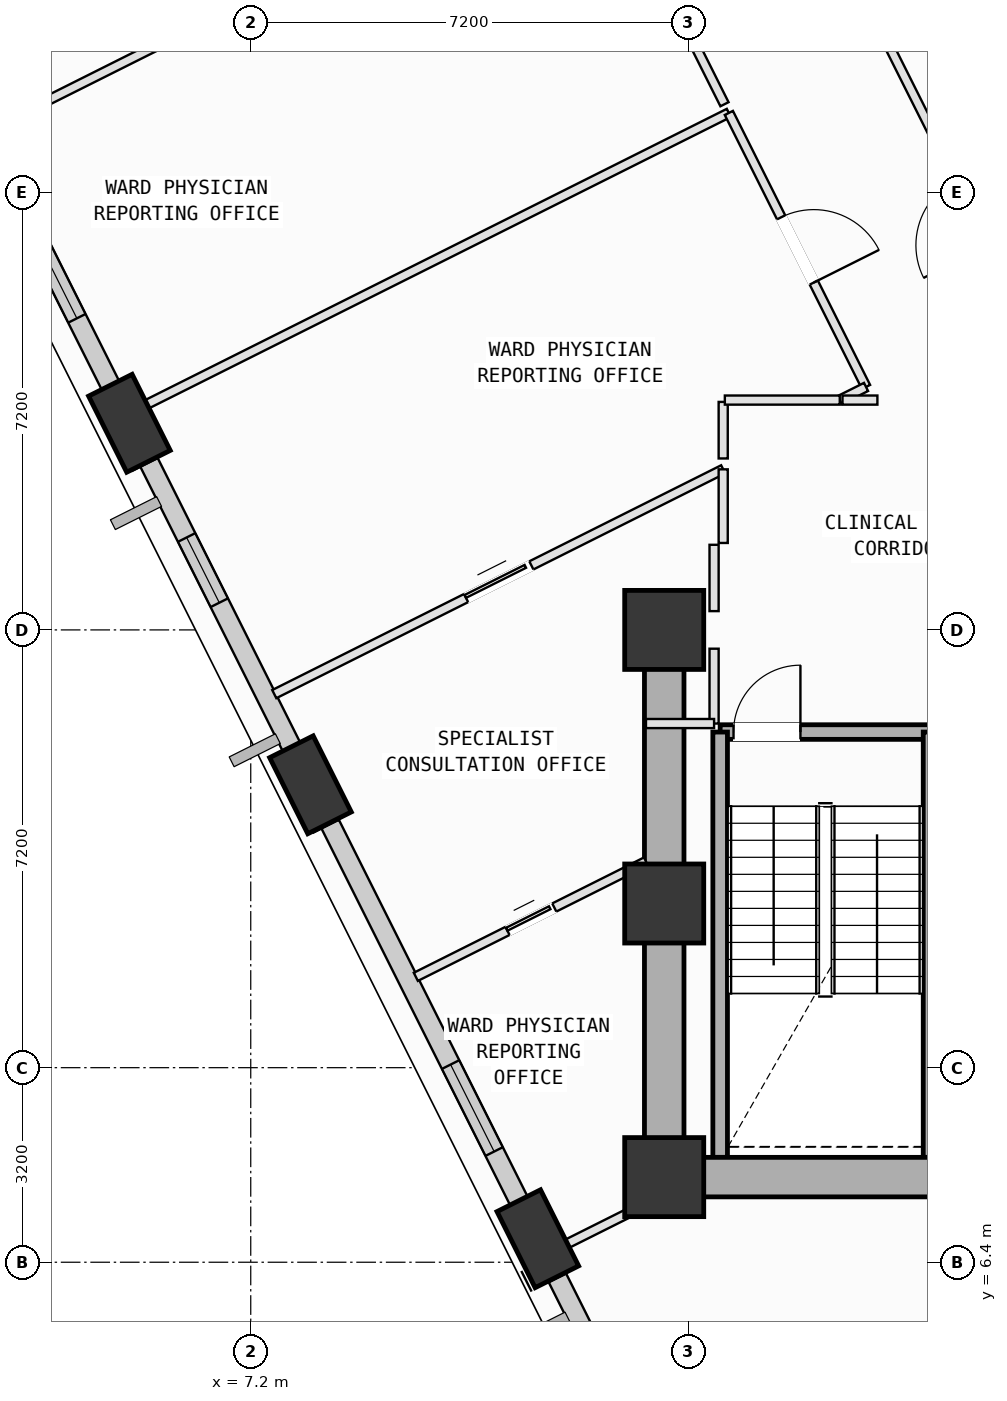
"""IFC4 building model, lengths in metres.
Left out: names, types, materials, properties, quantities, classifications, styles, units other than length and angle.
Written with IfcOpenShell. Run it as: python <this file> out.ifc"""

import sys

from ifc_helpers import new_model, si_unit, direction, frame, frame_2d, origin, origin_2d, place, context, subcontext, project, spatial, rectangle, extrude, element, fill, save


model = new_model("IFC4")
c1 = context("Model", 3, precision=1e-05, world=origin(), true_north=direction((0.0, 1.0)))
c2 = subcontext(c1, "Body", "Model", "MODEL_VIEW")
j1 = project(units=[si_unit("LENGTHUNIT", "METRE"), si_unit("PLANEANGLEUNIT", "RADIAN")], contexts=[c1])
p1 = place(None, origin())
s1 = spatial("IfcSite", under=j1, at=p1, CompositionType="ELEMENT")
p2 = place(p1, origin())
s2 = spatial("IfcBuilding", under=s1, at=p2, CompositionType="ELEMENT")
p3 = place(p2, frame((0.0, 0.0, 136.4)))
s3 = spatial("IfcBuildingStorey", under=s2, at=p3, CompositionType="ELEMENT", Elevation=136.4)
for number, where, z_axis, x_axis in (
    (1, (14.0, 7.8, 0.0), (0.0, 0.0, 1.0), (1.0, 0.0, 0.0)),
    (2, (14.0, 12.3, 0.0), (0.0, 0.0, 1.0), (1.0, 0.0, 0.0)),
    (3, (14.0, 16.8, 0.0), (0.0, 0.0, 1.0), (1.0, 0.0, 0.0)),
):
    element("IfcColumn", number, at=place(p3, frame(where, z_axis=z_axis, x_axis=x_axis)), inside=s3, PredefinedType="COLUMN", context=c2, shape_type="SweptSolid", body=[
        extrude(rectangle(XDim=1.3, YDim=1.3, at=origin_2d()), origin(), (0.0, 0.0, 1.0), 4.0),
    ])
p4 = place(p3, frame((5.205, 20.198, 0.002), z_axis=(0.019896938328, -0.116712528487, 0.992966413097), x_axis=(-0.590599930302, 0.799990252323, 0.105864623533)))
e4 = element("IfcColumn", 4, at=p4, inside=s3, PredefinedType="COLUMN", context=c2, shape_type="SweptSolid", body=[
    extrude(rectangle(XDim=1.4, YDim=0.8, at=origin_2d()), origin(), (0.0, 0.0, 1.0), 4.025),
])
p5 = place(p3, frame((8.182, 14.252, 0.002), z_axis=(0.044309037801, -0.104338679425, 0.993554301055), x_axis=(-0.759390194111, 0.642691936865, 0.10135880513)))
e5 = element("IfcColumn", 5, at=p5, inside=s3, PredefinedType="COLUMN", context=c2, shape_type="SweptSolid", body=[
    extrude(rectangle(XDim=1.4, YDim=0.8, at=origin_2d()), origin(), (0.0, 0.0, 1.0), 4.022),
])
p6 = place(p3, frame((11.921, 6.786, 0.002), z_axis=(0.07493745698, -0.088650708217, 0.993239865025), x_axis=(-0.915289640209, 0.389193777444, 0.103793439703)))
e6 = element("IfcColumn", 6, at=p6, inside=s3, PredefinedType="COLUMN", context=c2, shape_type="SweptSolid", body=[
    extrude(rectangle(XDim=1.4, YDim=0.8, at=origin_2d()), origin(), (0.0, 0.0, 1.0), 4.023),
])
p7 = place(p3, frame((5.087, 20.434, 0.0), z_axis=(0.0, 0.0, 1.0), x_axis=(-0.447768773835, 0.894149386388, 0.0)))
e7 = element("IfcWall", 7, at=p7, inside=s3, PredefinedType="SOLIDWALL", context=c2, shape_type="SweptSolid", body=[
    extrude(rectangle(XDim=5.628, YDim=0.32, at=frame_2d((2.814, 0.0))), origin(), (0.0, 0.0, 1.0), 3.165),
])
p8 = place(p7, frame((1.667, 0.0, 0.75)))
e8 = element("IfcOpeningElement", 8, at=p8, cuts=e7, PredefinedType="OPENING", context=c2, shape_type="SweptSolid", body=[
    extrude(rectangle(XDim=1.8, YDim=2.05, at=frame_2d((0.9, 1.025))), frame((0.0, 0.17, 0.0), z_axis=(0.0, -1.0, 0.0), x_axis=(1.0, 0.0, 0.0)), (0.0, 0.0, 1.0), 0.34),
])
p9 = place(p3, frame((8.062, 14.492, 0.0), z_axis=(0.0, 0.0, 1.0), x_axis=(-0.447765402244, 0.894151074793, 0.0)))
e9 = element("IfcWall", 9, at=p9, inside=s3, PredefinedType="SOLIDWALL", context=c2, shape_type="SweptSolid", body=[
    extrude(rectangle(XDim=5.662, YDim=0.32, at=frame_2d((2.831, 0.0))), origin(), (0.0, 0.0, 1.0), 3.165),
])
p10 = place(p9, frame((3.081, 0.0, 0.75)))
e10 = element("IfcOpeningElement", 10, at=p10, cuts=e9, PredefinedType="OPENING", context=c2, shape_type="SweptSolid", body=[
    extrude(rectangle(XDim=1.2, YDim=1.75, at=frame_2d((0.6, 0.875))), frame((0.0, 0.17, 0.0), z_axis=(0.0, -1.0, 0.0), x_axis=(1.0, 0.0, 0.0)), (0.0, 0.0, 1.0), 0.34),
])
p11 = place(p3, frame((11.802, 7.024, 0.0), z_axis=(0.0, 0.0, 1.0), x_axis=(-0.447770775833, 0.894148383832, 0.0)))
e11 = element("IfcWall", 11, at=p11, inside=s3, PredefinedType="SOLIDWALL", context=c2, shape_type="SweptSolid", body=[
    extrude(rectangle(XDim=7.36, YDim=0.32, at=frame_2d((3.68, 0.0))), origin(), (0.0, 0.0, 1.0), 3.165),
])
p12 = place(p11, frame((1.338, 0.0, 0.75)))
e12 = element("IfcOpeningElement", 12, at=p12, cuts=e11, PredefinedType="OPENING", context=c2, shape_type="SweptSolid", body=[
    extrude(rectangle(XDim=1.6, YDim=1.95, at=frame_2d((0.8, 0.975))), frame((0.0, 0.17, 0.0), z_axis=(0.0, -1.0, 0.0), x_axis=(1.0, 0.0, 0.0)), (0.0, 0.0, 1.0), 0.34),
])
p13 = place(p3, frame((15.03, 0.578, 0.0), z_axis=(0.0, 0.0, 1.0), x_axis=(-0.447762720767, 0.894152417595, 0.0)))
e13 = element("IfcWall", 13, at=p13, inside=s3, PredefinedType="SOLIDWALL", context=c2, shape_type="SweptSolid", body=[
    extrude(rectangle(XDim=6.223, YDim=0.32, at=frame_2d((3.112, 0.0))), origin(), (0.0, 0.0, 1.0), 3.165),
])
p14 = place(p13, frame((2.114, 0.0, 0.75)))
e14 = element("IfcOpeningElement", 14, at=p14, cuts=e13, PredefinedType="OPENING", context=c2, shape_type="SweptSolid", body=[
    extrude(rectangle(XDim=2.0, YDim=1.95, at=frame_2d((1.0, 0.975))), frame((0.0, 0.17, 0.0), z_axis=(0.0, -1.0, 0.0), x_axis=(1.0, 0.0, 0.0)), (0.0, 0.0, 1.0), 0.34),
])
p15 = place(p3, frame((14.92, 15.12, 0.0), z_axis=(0.0, 0.0, 1.0), x_axis=(1.0, 0.0, 0.0)))
e15 = element("IfcWall", 15, at=p15, inside=s3, PredefinedType="SOLIDWALL", context=c2, shape_type="SweptSolid", body=[
    extrude(rectangle(XDim=3.46, YDim=0.24, at=frame_2d((1.73, 0.0))), origin(), (0.0, 0.0, 1.0), 3.78),
])
p16 = place(p15, frame((0.22, 0.0, 0.0)))
e16 = element("IfcOpeningElement", 16, at=p16, cuts=e15, PredefinedType="OPENING", context=c2, shape_type="SweptSolid", body=[
    extrude(rectangle(XDim=1.1, YDim=2.15, at=frame_2d((0.55, 1.075))), frame((0.0, 0.13, 0.0), z_axis=(0.0, -1.0, 0.0), x_axis=(1.0, 0.0, 0.0)), (0.0, 0.0, 1.0), 0.26),
])
for number, where, z_axis, x_axis in (
    (17, (18.38, 15.12, 0.0), (0.0, 0.0, 1.0), (0.0, -1.0, 0.0)),
    (18, (14.92, 8.125, 0.0), (0.0, 0.0, 1.0), (0.0, 1.0, 0.0)),
):
    element("IfcWall", number, at=place(p3, frame(where, z_axis=z_axis, x_axis=x_axis)), inside=s3, PredefinedType="SOLIDWALL", context=c2, shape_type="SweptSolid", body=[
        extrude(rectangle(XDim=6.995, YDim=0.24, at=frame_2d((3.498, 0.0))), origin(), (0.0, 0.0, 1.0), 3.78),
    ])
p17 = place(p3, frame((14.0, 7.8, 0.0), z_axis=(0.0, 0.0, 1.0), x_axis=(1.0, 0.0, 0.0)))
e19 = element("IfcWall", 19, at=p17, inside=s3, PredefinedType="SHEAR", context=c2, shape_type="SweptSolid", body=[
    extrude(rectangle(XDim=10.8, YDim=0.65, at=frame_2d((5.4, 0.0))), origin(), (0.0, 0.0, 1.0), 3.78),
])
p18 = place(p3, frame((14.0, 16.8, 0.0), z_axis=(0.0, 0.0, 1.0), x_axis=(0.0, -1.0, 0.0)))
e20 = element("IfcWall", 20, at=p18, inside=s3, PredefinedType="SHEAR", context=c2, shape_type="SweptSolid", body=[
    extrude(rectangle(XDim=9.0, YDim=0.65, at=frame_2d((4.5, 0.0))), origin(), (0.0, 0.0, 1.0), 3.78),
])
p19 = place(p3, frame((13.994, 7.5, 0.0), z_axis=(0.0, 0.0, 1.0), x_axis=(-0.894183245332, -0.44770115453, 0.0)))
e21 = element("IfcWall", 21, at=p19, inside=s3, PredefinedType="PARTITIONING", context=c2, shape_type="SweptSolid", body=[
    extrude(rectangle(XDim=2.403, YDim=0.15, at=frame_2d((1.202, 0.0))), origin(), (0.0, 0.0, 1.0), 2.965),
])
p20 = place(p3, frame((11.845, 6.424, 0.0), z_axis=(0.0, 0.0, 1.0), x_axis=(-0.448091991479, 0.893987453588, 0.0)))
e22 = element("IfcWall", 22, at=p20, inside=s3, PredefinedType="PARTITIONING", context=c2, shape_type="SweptSolid", body=[
    extrude(rectangle(XDim=0.556, YDim=0.15, at=frame_2d((0.278, 0.0))), origin(), (0.0, 0.0, 1.0), 3.165),
])
p21 = place(p3, frame((9.915, 11.094, 0.0), z_axis=(0.0, 0.0, 1.0), x_axis=(0.894092441926, 0.447882468167, 0.0)))
e23 = element("IfcWall", 23, at=p21, inside=s3, PredefinedType="PARTITIONING", context=c2, shape_type="SweptSolid", body=[
    extrude(rectangle(XDim=4.233, YDim=0.15, at=frame_2d((2.117, 0.0))), origin(), (0.0, 0.0, 1.0), 3.78),
])
p22 = place(p21, frame((1.687, 0.0, 0.0)))
e24 = element("IfcOpeningElement", 24, at=p22, cuts=e23, PredefinedType="OPENING", context=c2, shape_type="SweptSolid", body=[
    extrude(rectangle(XDim=0.86, YDim=2.06, at=frame_2d((0.43, 1.03))), frame((0.0, 0.085, 0.0), z_axis=(0.0, -1.0, 0.0), x_axis=(1.0, 0.0, 0.0)), (0.0, 0.0, 1.0), 0.17),
])
p23 = place(p3, frame((14.82, 18.2, 0.0), z_axis=(0.0, 0.0, 1.0), x_axis=(0.0, -1.0, 0.0)))
e25 = element("IfcWall", 25, at=p23, inside=s3, PredefinedType="PARTITIONING", context=c2, shape_type="SweptSolid", body=[
    extrude(rectangle(XDim=1.091, YDim=0.15, at=frame_2d((0.545, 0.0))), origin(), (0.0, 0.0, 1.0), 3.78),
])
p24 = place(p3, frame((14.82, 16.491, 0.0), z_axis=(0.0, 0.0, 1.0), x_axis=(0.0, -1.0, 0.0)))
e26 = element("IfcWall", 26, at=p24, inside=s3, PredefinedType="PARTITIONING", context=c2, shape_type="SweptSolid", body=[
    extrude(rectangle(XDim=1.231, YDim=0.15, at=frame_2d((0.615, 0.0))), origin(), (0.0, 0.0, 1.0), 3.78),
])
p25 = place(p3, frame((14.82, 15.26, 0.0), z_axis=(0.0, 0.0, 1.0), x_axis=(-1.0, 0.0, 0.0)))
e27 = element("IfcWall", 27, at=p25, inside=s3, PredefinedType="PARTITIONING", context=c2, shape_type="SweptSolid", body=[
    extrude(rectangle(XDim=1.12, YDim=0.15, at=frame_2d((0.56, 0.0))), origin(), (0.0, 0.0, 1.0), 3.78),
])
p26 = place(p3, frame((8.301, 13.502, 0.0), z_axis=(0.0, 0.0, 1.0), x_axis=(-0.448492436282, 0.893786626996, 0.0)))
e28 = element("IfcWall", 28, at=p26, inside=s3, PredefinedType="PARTITIONING", context=c2, shape_type="SweptSolid", body=[
    extrude(rectangle(XDim=0.992, YDim=0.15, at=frame_2d((0.496, 0.0))), origin(), (0.0, 0.0, 1.0), 3.165),
])
p27 = place(p3, frame((7.587, 15.744, 0.0), z_axis=(0.0, 0.0, 1.0), x_axis=(0.894160922131, 0.447745737371, 0.0)))
e29 = element("IfcWall", 29, at=p27, inside=s3, PredefinedType="PARTITIONING", context=c2, shape_type="SweptSolid", body=[
    extrude(rectangle(XDim=8.257, YDim=0.15, at=frame_2d((4.128, 0.0))), origin(), (0.0, 0.0, 1.0), 3.78),
])
p28 = place(p27, frame((3.529, 0.0, 0.0)))
e30 = element("IfcOpeningElement", 30, at=p28, cuts=e29, PredefinedType="OPENING", context=c2, shape_type="SweptSolid", body=[
    extrude(rectangle(XDim=1.2, YDim=2.15, at=frame_2d((0.6, 1.075))), frame((0.0, 0.085, 0.0), z_axis=(0.0, -1.0, 0.0), x_axis=(1.0, 0.0, 0.0)), (0.0, 0.0, 1.0), 0.17),
])
p29 = place(p3, frame((14.97, 19.441, 0.0), z_axis=(0.0, 0.0, 1.0), x_axis=(0.0, -1.0, 0.0)))
e31 = element("IfcWall", 31, at=p29, inside=s3, PredefinedType="PARTITIONING", context=c2, shape_type="SweptSolid", body=[
    extrude(rectangle(XDim=1.211, YDim=0.15, at=frame_2d((0.605, 0.0))), origin(), (0.0, 0.0, 1.0), 2.965),
])
p30 = place(p3, frame((14.97, 20.55, 0.0), z_axis=(0.0, 0.0, 1.0), x_axis=(0.0, -1.0, 0.0)))
e32 = element("IfcWall", 32, at=p30, inside=s3, PredefinedType="PARTITIONING", context=c2, shape_type="SweptSolid", body=[
    extrude(rectangle(XDim=0.93, YDim=0.15, at=frame_2d((0.465, 0.0))), origin(), (0.0, 0.0, 1.0), 2.965),
])
p31 = place(p3, frame((5.321, 19.452, 0.0), z_axis=(0.0, 0.0, 1.0), x_axis=(-0.447325844386, 0.894371057752, 0.0)))
e33 = element("IfcWall", 33, at=p31, inside=s3, PredefinedType="PARTITIONING", context=c2, shape_type="SweptSolid", body=[
    extrude(rectangle(XDim=0.87, YDim=0.15, at=frame_2d((0.435, 0.0))), origin(), (0.0, 0.0, 1.0), 3.165),
])
p32 = place(p3, frame((5.203, 20.366, 0.0), z_axis=(0.0, 0.0, 1.0), x_axis=(0.894174650725, 0.447718319929, 0.0)))
e34 = element("IfcWall", 34, at=p32, inside=s3, PredefinedType="PARTITIONING", context=c2, shape_type="SweptSolid", body=[
    extrude(rectangle(XDim=11.027, YDim=0.15, at=frame_2d((5.514, 0.0))), origin(), (0.0, 0.0, 1.0), 3.78),
])
p33 = place(p3, frame((15.063, 25.303, 0.0), z_axis=(0.0, 0.0, 1.0), x_axis=(0.447620432857, -0.894223656637, 0.0)))
e35 = element("IfcWall", 35, at=p33, inside=s3, PredefinedType="PARTITIONING", context=c2, shape_type="SweptSolid", body=[
    extrude(rectangle(XDim=5.04, YDim=0.15, at=frame_2d((2.52, 0.0))), origin(), (0.0, 0.0, 1.0), 3.78),
])
p34 = place(p33, frame((1.92, 0.0, 0.0)))
e36 = element("IfcOpeningElement", 36, at=p34, cuts=e35, PredefinedType="OPENING", context=c2, shape_type="SweptSolid", body=[
    extrude(rectangle(XDim=1.2, YDim=2.15, at=frame_2d((0.6, 1.075))), frame((0.0, 0.085, 0.0), z_axis=(0.0, -1.0, 0.0), x_axis=(1.0, 0.0, 0.0)), (0.0, 0.0, 1.0), 0.17),
])
p35 = place(p3, frame((17.319, 20.796, 0.0), z_axis=(0.0, 0.0, 1.0), x_axis=(-0.894629275708, -0.446809197585, 0.0)))
e37 = element("IfcWall", 37, at=p35, inside=s3, PredefinedType="PARTITIONING", context=c2, shape_type="SweptSolid", body=[
    extrude(rectangle(XDim=0.483, YDim=0.15, at=frame_2d((0.241, 0.0))), origin(), (0.0, 0.0, 1.0), 3.78),
])
p36 = place(p3, frame((16.887, 20.58, 0.0), z_axis=(0.0, 0.0, 1.0), x_axis=(-1.0, 0.0, 0.0)))
e38 = element("IfcWall", 38, at=p36, inside=s3, PredefinedType="PARTITIONING", context=c2, shape_type="SweptSolid", body=[
    extrude(rectangle(XDim=1.89, YDim=0.15, at=frame_2d((0.945, 0.0))), origin(), (0.0, 0.0, 1.0), 3.78),
])
p37 = place(p3, frame((2.93, 25.042, 0.0), z_axis=(0.0, 0.0, 1.0), x_axis=(0.894101883429, 0.447863619921, 0.0)))
e39 = element("IfcWall", 39, at=p37, inside=s3, PredefinedType="PARTITIONING", context=c2, shape_type="SweptSolid", body=[
    extrude(rectangle(XDim=10.965, YDim=0.15, at=frame_2d((5.482, 0.0))), origin(), (0.0, 0.0, 1.0), 3.78),
])
p38 = place(p3, frame((12.734, 29.953, 0.0), z_axis=(0.0, 0.0, 1.0), x_axis=(0.447794738158, -0.894136383601, 0.0)))
e40 = element("IfcWall", 40, at=p38, inside=s3, PredefinedType="PARTITIONING", context=c2, shape_type="SweptSolid", body=[
    extrude(rectangle(XDim=5.041, YDim=0.15, at=frame_2d((2.52, 0.0))), origin(), (0.0, 0.0, 1.0), 3.78),
])
p39 = place(p38, frame((1.92, 0.0, 0.0)))
e41 = element("IfcOpeningElement", 41, at=p39, cuts=e40, PredefinedType="OPENING", context=c2, shape_type="SweptSolid", body=[
    extrude(rectangle(XDim=1.2, YDim=2.15, at=frame_2d((0.6, 1.075))), frame((0.0, 0.085, 0.0), z_axis=(0.0, -1.0, 0.0), x_axis=(1.0, 0.0, 0.0)), (0.0, 0.0, 1.0), 0.17),
])
p40 = place(p3, frame((20.517, 20.776, 0.0), z_axis=(0.0, 0.0, 1.0), x_axis=(-0.447833274266, 0.894117083195, 0.0)))
e42 = element("IfcWall", 42, at=p40, inside=s3, PredefinedType="PARTITIONING", context=c2, shape_type="SweptSolid", body=[
    extrude(rectangle(XDim=6.46, YDim=0.15, at=frame_2d((3.23, 0.0))), origin(), (0.0, 0.0, 1.0), 3.78),
])
p41 = place(p40, frame((2.63, 0.0, 0.0)))
e43 = element("IfcOpeningElement", 43, at=p41, cuts=e42, PredefinedType="OPENING", context=c2, shape_type="SweptSolid", body=[
    extrude(rectangle(XDim=1.2, YDim=2.15, at=frame_2d((0.6, 1.075))), frame((0.0, 0.085, 0.0), z_axis=(0.0, -1.0, 0.0), x_axis=(1.0, 0.0, 0.0)), (0.0, 0.0, 1.0), 0.17),
])
p42 = place(p3, frame((17.506, 20.58, 0.0), z_axis=(0.0, 0.0, 1.0), x_axis=(-1.0, 0.0, 0.0)))
e44 = element("IfcWall", 44, at=p42, inside=s3, PredefinedType="PARTITIONING", context=c2, shape_type="SweptSolid", body=[
    extrude(rectangle(XDim=0.574, YDim=0.15, at=frame_2d((0.287, 0.0))), origin(), (0.0, 0.0, 1.0), 3.78),
])
p43 = place(p8, origin())
e45 = element("IfcWindow", 45, at=p43, inside=s3, PartitioningType="SINGLE_PANEL", PredefinedType="WINDOW", context=c2, shape_type="SweptSolid", body=[
    extrude(rectangle(XDim=1.8, YDim=2.05, at=frame_2d((0.9, 1.025))), frame((0.0, 0.03, 0.0), z_axis=(0.0, -1.0, 0.0), x_axis=(1.0, 0.0, 0.0)), (0.0, 0.0, 1.0), 0.06),
])
fill(e8, e45)
p44 = place(p10, origin())
e46 = element("IfcWindow", 46, at=p44, inside=s3, PartitioningType="SINGLE_PANEL", PredefinedType="WINDOW", context=c2, shape_type="SweptSolid", body=[
    extrude(rectangle(XDim=1.2, YDim=1.75, at=frame_2d((0.6, 0.875))), frame((0.0, 0.03, 0.0), z_axis=(0.0, -1.0, 0.0), x_axis=(1.0, 0.0, 0.0)), (0.0, 0.0, 1.0), 0.06),
])
fill(e10, e46)
p45 = place(p12, origin())
e47 = element("IfcWindow", 47, at=p45, inside=s3, PartitioningType="SINGLE_PANEL", PredefinedType="WINDOW", context=c2, shape_type="SweptSolid", body=[
    extrude(rectangle(XDim=1.6, YDim=1.95, at=frame_2d((0.8, 0.975))), frame((0.0, 0.03, 0.0), z_axis=(0.0, -1.0, 0.0), x_axis=(1.0, 0.0, 0.0)), (0.0, 0.0, 1.0), 0.06),
])
fill(e12, e47)
p46 = place(p16, origin())
e48 = element("IfcDoor", 48, at=p46, inside=s3, OperationType="SINGLE_SWING_RIGHT", PredefinedType="DOOR", context=c2, shape_type="SweptSolid", body=[
    extrude(rectangle(XDim=1.1, YDim=2.15, at=frame_2d((0.55, 1.075))), frame((0.0, 0.025, 0.0), z_axis=(0.0, -1.0, 0.0), x_axis=(1.0, 0.0, 0.0)), (0.0, 0.0, 1.0), 0.05),
])
fill(e16, e48)
p47 = place(p34, origin())
e49 = element("IfcDoor", 49, at=p47, inside=s3, OperationType="SINGLE_SWING_RIGHT", PredefinedType="DOOR", context=c2, shape_type="SweptSolid", body=[
    extrude(rectangle(XDim=1.2, YDim=2.15, at=frame_2d((0.6, 1.075))), frame((0.0, 0.025, 0.0), z_axis=(0.0, -1.0, 0.0), x_axis=(1.0, 0.0, 0.0)), (0.0, 0.0, 1.0), 0.05),
])
fill(e36, e49)
p48 = place(p28, origin())
e50 = element("IfcDoor", 50, at=p48, inside=s3, OperationType="SLIDING_TO_LEFT", PredefinedType="DOOR", context=c2, shape_type="SweptSolid", body=[
    extrude(rectangle(XDim=1.2, YDim=2.15, at=frame_2d((0.6, 1.075))), frame((0.0, 0.025, 0.0), z_axis=(0.0, -1.0, 0.0), x_axis=(1.0, 0.0, 0.0)), (0.0, 0.0, 1.0), 0.05),
])
fill(e30, e50)
p49 = place(p22, origin())
e51 = element("IfcDoor", 51, at=p49, inside=s3, OperationType="SLIDING_TO_LEFT", PredefinedType="DOOR", context=c2, shape_type="SweptSolid", body=[
    extrude(rectangle(XDim=0.86, YDim=2.06, at=frame_2d((0.43, 1.03))), frame((0.0, 0.025, 0.0), z_axis=(0.0, -1.0, 0.0), x_axis=(1.0, 0.0, 0.0)), (0.0, 0.0, 1.0), 0.05),
])
fill(e24, e51)
save(model, sys.argv[1])
